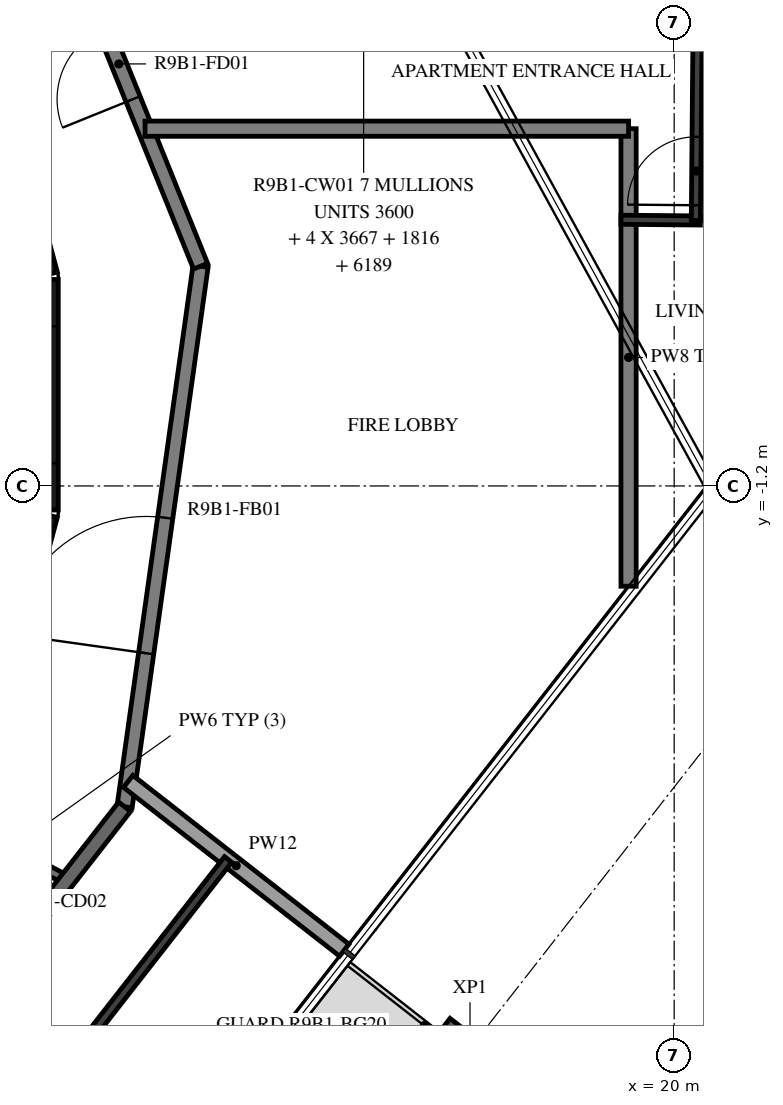
"""IFC4 building model, lengths in metres.
Left out: names, types, materials, properties, quantities, classifications, styles, units other than length and angle.
Written with IfcOpenShell. Run it as: python <this file> out.ifc"""

import sys

from ifc_helpers import new_model, si_unit, direction, frame, frame_2d, origin, origin_2d, place, context, subcontext, project, spatial, rectangle, i_section, extrude, element, fill, save


model = new_model("IFC4")
c1 = context("Model", 3, precision=1e-05, world=origin(), true_north=direction((0.0, 1.0)))
c2 = subcontext(c1, "Body", "Model", "MODEL_VIEW")
j1 = project(units=[si_unit("LENGTHUNIT", "METRE"), si_unit("PLANEANGLEUNIT", "RADIAN")], contexts=[c1])
p1 = place(None, origin())
s1 = spatial("IfcSite", under=j1, at=p1, CompositionType="ELEMENT")
p2 = place(p1, origin())
s2 = spatial("IfcBuilding", under=s1, at=p2, CompositionType="ELEMENT")
p3 = place(p2, frame((0.0, 0.0, 343.5)))
s3 = spatial("IfcBuildingStorey", under=s2, at=p3, CompositionType="ELEMENT", Elevation=343.5)
p4 = place(p3, frame((17.314, -8.6, -0.38), z_axis=(0.0, 0.0, 1.0), x_axis=(-0.615661060634, -0.788011077599, 0.0)))
e1 = element("IfcColumn", 1, at=p4, inside=s3, PredefinedType="COLUMN", context=c2, shape_type="SweptSolid", body=[
    extrude(i_section(OverallWidth=0.3, OverallDepth=0.9, WebThickness=0.019, FlangeThickness=0.035, FilletRadius=0.03, at=origin_2d()), origin(), (0.0, 0.0, 1.0), 3.5),
])
p5 = place(p3, frame((10.858, -4.479, 0.0), z_axis=(0.0, 0.0, 1.0), x_axis=(0.258734743916, 0.965948410781, 0.0)))
e2 = element("IfcWall", 2, at=p5, inside=s3, PredefinedType="SHEAR", context=c2, shape_type="SweptSolid", body=[
    extrude(rectangle(XDim=3.033, YDim=0.5, at=frame_2d((1.516, 0.0))), origin(), (0.0, 0.0, 1.0), 3.12),
])
p6 = place(p3, frame((11.647, -1.516, 0.0), z_axis=(0.0, 0.0, 1.0), x_axis=(0.0, 1.0, 0.0)))
e3 = element("IfcWall", 3, at=p6, inside=s3, PredefinedType="SHEAR", context=c2, shape_type="SweptSolid", body=[
    extrude(rectangle(XDim=3.033, YDim=0.5, at=frame_2d((1.516, 0.0))), origin(), (0.0, 0.0, 1.0), 3.12),
])
p7 = place(p6, frame((0.616, 0.0, 0.0)))
e4 = element("IfcOpeningElement", 4, at=p7, cuts=e3, PredefinedType="OPENING", context=c2, shape_type="SweptSolid", body=[
    extrude(rectangle(XDim=1.8, YDim=2.1, at=frame_2d((0.9, 1.05))), frame((0.0, 0.26, 0.0), z_axis=(0.0, -1.0, 0.0), x_axis=(1.0, 0.0, 0.0)), (0.0, 0.0, 1.0), 0.52),
])
p8 = place(p3, frame((11.643, 1.55, 0.0), z_axis=(0.0, 0.0, 1.0), x_axis=(-0.258734743916, 0.965948410781, 0.0)))
e5 = element("IfcWall", 5, at=p8, inside=s3, PredefinedType="SHEAR", context=c2, shape_type="SweptSolid", body=[
    extrude(rectangle(XDim=3.033, YDim=0.5, at=frame_2d((1.516, 0.0))), origin(), (0.0, 0.0, 1.0), 3.12),
])
p9 = place(p3, frame((10.511, -5.589, 0.0), z_axis=(0.0, 0.0, 1.0), x_axis=(0.882959677414, -0.469448834337, 0.0)))
e6 = element("IfcWall", 6, at=p9, inside=s3, PredefinedType="PARTITIONING", context=c2, shape_type="SweptSolid", body=[
    extrude(rectangle(XDim=1.702, YDim=0.12, at=frame_2d((0.851, 0.0))), origin(), (0.0, 0.0, 1.0), 3.12),
])
p10 = place(p9, frame((0.1, 0.0, 0.0)))
e7 = element("IfcOpeningElement", 7, at=p10, cuts=e6, PredefinedType="OPENING", context=c2, shape_type="SweptSolid", body=[
    extrude(rectangle(XDim=1.2, YDim=2.1, at=frame_2d((0.6, 1.05))), frame((0.0, 0.07, 0.0), z_axis=(0.0, -1.0, 0.0), x_axis=(1.0, 0.0, 0.0)), (0.0, 0.0, 1.0), 0.14),
])
p11 = place(p3, frame((12.77, -5.42, 0.0), z_axis=(0.0, 0.0, 1.0), x_axis=(0.139155334385, 0.990270565508, 0.0)))
e8 = element("IfcWall", 8, at=p11, inside=s3, PredefinedType="STANDARD", context=c2, shape_type="SweptSolid", body=[
    extrude(rectangle(XDim=7.181, YDim=0.2, at=frame_2d((3.59, 0.0))), origin(), (0.0, 0.0, 1.0), 3.12),
])
p12 = place(p11, frame((2.039, 0.0, 0.0)))
e9 = element("IfcOpeningElement", 9, at=p12, cuts=e8, PredefinedType="OPENING", context=c2, shape_type="SweptSolid", body=[
    extrude(rectangle(XDim=1.8, YDim=2.1, at=frame_2d((0.9, 1.05))), frame((0.0, 0.11, 0.0), z_axis=(0.0, -1.0, 0.0), x_axis=(1.0, 0.0, 0.0)), (0.0, 0.0, 1.0), 0.22),
])
p13 = place(p3, frame((13.769, 1.691, 0.0), z_axis=(0.0, 0.0, 1.0), x_axis=(-0.374618189599, 0.92717916932, 0.0)))
e10 = element("IfcWall", 10, at=p13, inside=s3, PredefinedType="STANDARD", context=c2, shape_type="SweptSolid", body=[
    extrude(rectangle(XDim=7.181, YDim=0.2, at=frame_2d((3.591, 0.0))), origin(), (0.0, 0.0, 1.0), 3.12),
])
p14 = place(p13, frame((2.371, 0.0, 0.0)))
e11 = element("IfcOpeningElement", 11, at=p14, cuts=e10, PredefinedType="OPENING", context=c2, shape_type="SweptSolid", body=[
    extrude(rectangle(XDim=1.0, YDim=2.1, at=frame_2d((0.5, 1.05))), frame((0.0, 0.11, 0.0), z_axis=(0.0, -1.0, 0.0), x_axis=(1.0, 0.0, 0.0)), (0.0, 0.0, 1.0), 0.22),
])
p15 = place(p3, frame((8.349, -11.079, 0.0), z_axis=(0.0, 0.0, 1.0), x_axis=(0.615669112324, 0.78800478687, 0.0)))
e12 = element("IfcWall", 12, at=p15, inside=s3, PredefinedType="STANDARD", context=c2, shape_type="SweptSolid", body=[
    extrude(rectangle(XDim=7.181, YDim=0.2, at=frame_2d((3.591, 0.0))), origin(), (0.0, 0.0, 1.0), 3.12),
])
p16 = place(p3, frame((19.4, -2.519, 0.0), z_axis=(0.0, 0.0, 1.0), x_axis=(0.0, 1.0, 0.0)))
e13 = element("IfcWall", 13, at=p16, inside=s3, PredefinedType="STANDARD", context=c2, shape_type="SweptSolid", body=[
    extrude(rectangle(XDim=6.019, YDim=0.2, at=frame_2d((3.01, 0.0))), origin(), (0.0, 0.0, 1.0), 3.12),
])
p17 = place(p3, frame((19.4, 3.5, 0.0), z_axis=(0.0, 0.0, 1.0), x_axis=(-1.0, 0.0, 0.0)))
e14 = element("IfcWall", 14, at=p17, inside=s3, PredefinedType="STANDARD", context=c2, shape_type="SweptSolid", body=[
    extrude(rectangle(XDim=6.362, YDim=0.2, at=frame_2d((3.181, 0.0))), origin(), (0.0, 0.0, 1.0), 3.12),
])
p18 = place(p3, frame((12.817, -5.086, 0.0), z_axis=(0.0, 0.0, 1.0), x_axis=(0.787994616725, -0.615682129034, 0.0)))
e15 = element("IfcWall", 15, at=p18, inside=s3, PredefinedType="STANDARD", context=c2, shape_type="SweptSolid", body=[
    extrude(rectangle(XDim=3.607, YDim=0.2, at=frame_2d((1.804, 0.0))), origin(), (0.0, 0.0, 1.0), 2.73),
])
p19 = place(p3, frame((19.3, 2.302, 0.0), z_axis=(0.0, 0.0, 1.0), x_axis=(0.999958506341, -0.009109643015, 0.0)))
e16 = element("IfcWall", 16, at=p19, inside=s3, PredefinedType="PARTITIONING", context=c2, shape_type="SweptSolid", body=[
    extrude(rectangle(XDim=1.045, YDim=0.12, at=frame_2d((0.522, 0.0))), origin(), (0.0, 0.0, 1.0), 3.12),
])
p20 = place(p3, frame((20.285, 2.293, 0.0), z_axis=(0.0, 0.0, 1.0), x_axis=(0.008900171034, 0.999960392693, 0.0)))
e17 = element("IfcWall", 17, at=p20, inside=s3, PredefinedType="PARTITIONING", context=c2, shape_type="SweptSolid", body=[
    extrude(rectangle(XDim=2.332, YDim=0.12, at=frame_2d((1.166, 0.0))), origin(), (0.0, 0.0, 1.0), 3.12),
])
p21 = place(p20, frame((0.2, 0.0, 0.0)))
e18 = element("IfcOpeningElement", 18, at=p21, cuts=e17, PredefinedType="OPENING", context=c2, shape_type="SweptSolid", body=[
    extrude(rectangle(XDim=0.9, YDim=2.1, at=frame_2d((0.45, 1.05))), frame((0.0, 0.07, 0.0), z_axis=(0.0, -1.0, 0.0), x_axis=(1.0, 0.0, 0.0)), (0.0, 0.0, 1.0), 0.14),
])
p22 = place(p3, frame((9.351, -12.233, 0.0), z_axis=(0.0, 0.0, 1.0), x_axis=(0.615678207218, 0.787997680933, 0.0)))
e19 = element("IfcWall", 19, at=p22, inside=s3, PredefinedType="PARTITIONING", context=c2, shape_type="SweptSolid", body=[
    extrude(rectangle(XDim=7.765, YDim=0.12, at=frame_2d((3.883, 0.0))), origin(), (0.0, 0.0, 1.0), 3.12),
])
p23 = place(p22, frame((0.2, 0.0, 0.0)))
e20 = element("IfcOpeningElement", 20, at=p23, cuts=e19, PredefinedType="OPENING", context=c2, shape_type="SweptSolid", body=[
    extrude(rectangle(XDim=0.9, YDim=2.1, at=frame_2d((0.45, 1.05))), frame((0.0, 0.07, 0.0), z_axis=(0.0, -1.0, 0.0), x_axis=(1.0, 0.0, 0.0)), (0.0, 0.0, 1.0), 0.14),
])
p24 = place(p14, origin())
e21 = element("IfcDoor", 21, at=p24, inside=s3, OperationType="SINGLE_SWING_LEFT", PredefinedType="DOOR", context=c2, shape_type="SweptSolid", body=[
    extrude(rectangle(XDim=1.0, YDim=2.1, at=frame_2d((0.5, 1.05))), frame((0.0, 0.025, 0.0), z_axis=(0.0, -1.0, 0.0), x_axis=(1.0, 0.0, 0.0)), (0.0, 0.0, 1.0), 0.05),
])
fill(e11, e21)
p25 = place(p21, origin())
e22 = element("IfcDoor", 22, at=p25, inside=s3, OperationType="SINGLE_SWING_RIGHT", PredefinedType="DOOR", context=c2, shape_type="SweptSolid", body=[
    extrude(rectangle(XDim=0.9, YDim=2.1, at=frame_2d((0.45, 1.05))), frame((0.0, 0.025, 0.0), z_axis=(0.0, -1.0, 0.0), x_axis=(1.0, 0.0, 0.0)), (0.0, 0.0, 1.0), 0.05),
])
fill(e18, e22)
p26 = place(p12, origin())
e23 = element("IfcDoor", 23, at=p26, inside=s3, OperationType="DOUBLE_DOOR_SINGLE_SWING", PredefinedType="DOOR", context=c2, shape_type="SweptSolid", body=[
    extrude(rectangle(XDim=1.8, YDim=2.1, at=frame_2d((0.9, 1.05))), frame((0.0, 0.025, 0.0), z_axis=(0.0, -1.0, 0.0), x_axis=(1.0, 0.0, 0.0)), (0.0, 0.0, 1.0), 0.05),
])
fill(e9, e23)
save(model, sys.argv[1])
